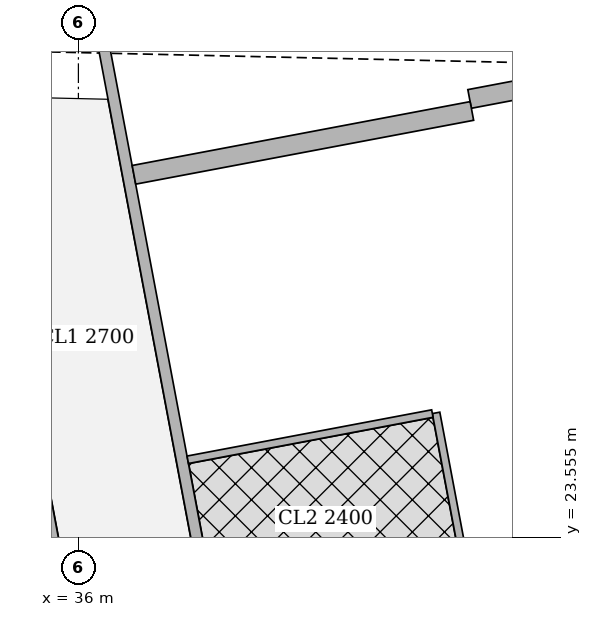
"""IFC4 building model, lengths in metres.
Left out: names, types, materials, properties, quantities, classifications, styles, units other than length and angle.
Written with IfcOpenShell. Run it as: python <this file> out.ifc"""

import sys

from ifc_helpers import new_model, si_unit, direction, frame, frame_2d, origin, place, context, subcontext, project, spatial, rectangle, extrude, element, fill, save


model = new_model("IFC4")
c1 = context("Model", 3, precision=1e-05, world=origin(), true_north=direction((0.0, 1.0)))
c2 = subcontext(c1, "Body", "Model", "MODEL_VIEW")
j1 = project(units=[si_unit("LENGTHUNIT", "METRE"), si_unit("PLANEANGLEUNIT", "RADIAN")], contexts=[c1])
p1 = place(None, origin())
s1 = spatial("IfcSite", under=j1, at=p1, CompositionType="ELEMENT")
p2 = place(p1, origin())
s2 = spatial("IfcBuilding", under=s1, at=p2, CompositionType="ELEMENT")
p3 = place(p2, frame((0.0, 0.0, 234.95)))
s3 = spatial("IfcBuildingStorey", under=s2, at=p3, CompositionType="ELEMENT", Elevation=234.95)
p4 = place(p3, frame((33.933, 42.73, 0.0), z_axis=(0.0, 0.0, 1.0), x_axis=(0.185595417643, -0.982626246825, 0.0)))
e1 = element("IfcWall", 1, at=p4, inside=s3, PredefinedType="SOLIDWALL", context=c2, shape_type="SweptSolid", body=[
    extrude(rectangle(XDim=41.051, YDim=0.15, at=frame_2d((20.525, 0.0))), origin(), (0.0, 0.0, 1.0), 2.5),
])
p5 = place(p4, frame((12.266, 0.0, 0.0)))
e2 = element("IfcOpeningElement", 2, at=p5, cuts=e1, PredefinedType="OPENING", context=c2, shape_type="SweptSolid", body=[
    extrude(rectangle(XDim=1.0, YDim=2.1, at=frame_2d((0.5, 1.05))), frame((0.0, 0.085, 0.0), z_axis=(0.0, -1.0, 0.0), x_axis=(1.0, 0.0, 0.0)), (0.0, 0.0, 1.0), 0.17),
])
p6 = place(p4, frame((16.082, 0.0, 0.0)))
e3 = element("IfcOpeningElement", 3, at=p6, cuts=e1, PredefinedType="OPENING", context=c2, shape_type="SweptSolid", body=[
    extrude(rectangle(XDim=1.0, YDim=2.1, at=frame_2d((0.5, 1.05))), frame((0.0, 0.085, 0.0), z_axis=(0.0, -1.0, 0.0), x_axis=(1.0, 0.0, 0.0)), (0.0, 0.0, 1.0), 0.17),
])
p7 = place(p4, frame((30.862, 0.0, 0.0)))
e4 = element("IfcOpeningElement", 4, at=p7, cuts=e1, PredefinedType="OPENING", context=c2, shape_type="SweptSolid", body=[
    extrude(rectangle(XDim=1.0, YDim=2.1, at=frame_2d((0.5, 1.05))), frame((0.0, 0.085, 0.0), z_axis=(0.0, -1.0, 0.0), x_axis=(1.0, 0.0, 0.0)), (0.0, 0.0, 1.0), 0.17),
])
p8 = place(p3, frame((40.706, 25.192, 0.0), z_axis=(0.0, 0.0, 1.0), x_axis=(0.185629824463, -0.982619747547, 0.0)))
e5 = element("IfcWall", 5, at=p8, inside=s3, PredefinedType="PARTITIONING", context=c2, shape_type="SweptSolid", body=[
    extrude(rectangle(XDim=9.659, YDim=0.1, at=frame_2d((4.83, 0.0))), origin(), (0.0, 0.0, 1.0), 2.5),
])
p9 = place(p8, frame((0.655, 0.0, 0.0)))
e6 = element("IfcOpeningElement", 6, at=p9, cuts=e5, PredefinedType="OPENING", context=c2, shape_type="SweptSolid", body=[
    extrude(rectangle(XDim=0.9, YDim=2.1, at=frame_2d((0.45, 1.05))), frame((0.0, 0.06, 0.0), z_axis=(0.0, -1.0, 0.0), x_axis=(1.0, 0.0, 0.0)), (0.0, 0.0, 1.0), 0.12),
])
p10 = place(p8, frame((4.166, 0.0, 0.0)))
e7 = element("IfcOpeningElement", 7, at=p10, cuts=e5, PredefinedType="OPENING", context=c2, shape_type="SweptSolid", body=[
    extrude(rectangle(XDim=0.9, YDim=2.1, at=frame_2d((0.45, 1.05))), frame((0.0, 0.06, 0.0), z_axis=(0.0, -1.0, 0.0), x_axis=(1.0, 0.0, 0.0)), (0.0, 0.0, 1.0), 0.12),
])
p11 = place(p8, frame((2.563, 0.0, 0.0)))
e8 = element("IfcOpeningElement", 8, at=p11, cuts=e5, PredefinedType="OPENING", context=c2, shape_type="SweptSolid", body=[
    extrude(rectangle(XDim=0.9, YDim=2.1, at=frame_2d((0.45, 1.05))), frame((0.0, 0.06, 0.0), z_axis=(0.0, -1.0, 0.0), x_axis=(1.0, 0.0, 0.0)), (0.0, 0.0, 1.0), 0.12),
])
p12 = place(p8, frame((6.074, 0.0, 0.0)))
e9 = element("IfcOpeningElement", 9, at=p12, cuts=e5, PredefinedType="OPENING", context=c2, shape_type="SweptSolid", body=[
    extrude(rectangle(XDim=0.9, YDim=2.1, at=frame_2d((0.45, 1.05))), frame((0.0, 0.06, 0.0), z_axis=(0.0, -1.0, 0.0), x_axis=(1.0, 0.0, 0.0)), (0.0, 0.0, 1.0), 0.12),
])
p13 = place(p3, frame((40.657, 25.183, 0.0), z_axis=(0.0, 0.0, 1.0), x_axis=(-0.982607026909, -0.185697147715, 0.0)))
e10 = element("IfcWall", 10, at=p13, inside=s3, PredefinedType="PARTITIONING", context=c2, shape_type="SweptSolid", body=[
    extrude(rectangle(XDim=3.275, YDim=0.1, at=frame_2d((1.637, 0.0))), origin(), (0.0, 0.0, 1.0), 3.5),
])
p14 = place(p3, frame((42.256, 29.532, 0.0), z_axis=(0.0, 0.0, 1.0), x_axis=(-0.982549954272, -0.185998890749, 0.0)))
e11 = element("IfcWall", 11, at=p14, inside=s3, PredefinedType="SOLIDWALL", context=c2, shape_type="SweptSolid", body=[
    extrude(rectangle(XDim=1.129, YDim=0.25, at=frame_2d((0.564, 0.0))), origin(), (0.0, 0.0, 1.0), 2.05),
])
p15 = place(p3, frame((41.177, 29.164, 0.0), z_axis=(0.0, 0.0, 1.0), x_axis=(-0.982612837616, -0.185666398014, 0.0)))
e12 = element("IfcWall", 12, at=p15, inside=s3, PredefinedType="SOLIDWALL", context=c2, shape_type="SweptSolid", body=[
    extrude(rectangle(XDim=4.525, YDim=0.25, at=frame_2d((2.262, 0.0))), origin(), (0.0, 0.0, 1.0), 2.5),
])
p16 = place(p3, frame((38.202, 10.163, 0.0), z_axis=(0.0, 0.0, 1.0), x_axis=(-0.185610321132, 0.982623431783, 0.0)))
e13 = element("IfcWall", 13, at=p16, inside=s3, PredefinedType="PARTITIONING", context=c2, shape_type="SweptSolid", body=[
    extrude(rectangle(XDim=25.111, YDim=0.125, at=frame_2d((12.556, 0.0))), origin(), (0.0, 0.0, 1.0), 2.5),
])
p17 = place(p16, frame((0.708, 0.0, 0.0)))
e14 = element("IfcOpeningElement", 14, at=p17, cuts=e13, PredefinedType="OPENING", context=c2, shape_type="SweptSolid", body=[
    extrude(rectangle(XDim=1.0, YDim=2.1, at=frame_2d((0.5, 1.05))), frame((0.0, 0.073, 0.0), z_axis=(0.0, -1.0, 0.0), x_axis=(1.0, 0.0, 0.0)), (0.0, 0.0, 1.0), 0.145),
])
p18 = place(p16, frame((13.378, 0.0, 0.0)))
e15 = element("IfcOpeningElement", 15, at=p18, cuts=e13, PredefinedType="OPENING", context=c2, shape_type="SweptSolid", body=[
    extrude(rectangle(XDim=1.0, YDim=2.1, at=frame_2d((0.5, 1.05))), frame((0.0, 0.073, 0.0), z_axis=(0.0, -1.0, 0.0), x_axis=(1.0, 0.0, 0.0)), (0.0, 0.0, 1.0), 0.145),
])
p19 = place(p16, frame((21.15, 0.0, 0.0)))
e16 = element("IfcOpeningElement", 16, at=p19, cuts=e13, PredefinedType="OPENING", context=c2, shape_type="SweptSolid", body=[
    extrude(rectangle(XDim=1.0, YDim=2.1, at=frame_2d((0.5, 1.05))), frame((0.0, 0.073, 0.0), z_axis=(0.0, -1.0, 0.0), x_axis=(1.0, 0.0, 0.0)), (0.0, 0.0, 1.0), 0.145),
])
p20 = place(p16, frame((23.453, 0.0, 0.0)))
e17 = element("IfcOpeningElement", 17, at=p20, cuts=e13, PredefinedType="OPENING", context=c2, shape_type="SweptSolid", body=[
    extrude(rectangle(XDim=1.0, YDim=2.1, at=frame_2d((0.5, 1.05))), frame((0.0, 0.073, 0.0), z_axis=(0.0, -1.0, 0.0), x_axis=(1.0, 0.0, 0.0)), (0.0, 0.0, 1.0), 0.145),
])
p21 = place(p5, origin())
e18 = element("IfcDoor", 18, at=p21, inside=s3, OperationType="SINGLE_SWING_RIGHT", PredefinedType="DOOR", context=c2, shape_type="SweptSolid", body=[
    extrude(rectangle(XDim=1.0, YDim=2.1, at=frame_2d((0.5, 1.05))), frame((0.0, 0.025, 0.0), z_axis=(0.0, -1.0, 0.0), x_axis=(1.0, 0.0, 0.0)), (0.0, 0.0, 1.0), 0.05),
])
fill(e2, e18)
p22 = place(p9, origin())
e19 = element("IfcDoor", 19, at=p22, inside=s3, OperationType="SINGLE_SWING_RIGHT", PredefinedType="DOOR", context=c2, shape_type="SweptSolid", body=[
    extrude(rectangle(XDim=0.9, YDim=2.1, at=frame_2d((0.45, 1.05))), frame((0.0, 0.025, 0.0), z_axis=(0.0, -1.0, 0.0), x_axis=(1.0, 0.0, 0.0)), (0.0, 0.0, 1.0), 0.05),
])
fill(e6, e19)
p23 = place(p6, origin())
e20 = element("IfcDoor", 20, at=p23, inside=s3, OperationType="SINGLE_SWING_LEFT", PredefinedType="DOOR", context=c2, shape_type="SweptSolid", body=[
    extrude(rectangle(XDim=1.0, YDim=2.1, at=frame_2d((0.5, 1.05))), frame((0.0, 0.025, 0.0), z_axis=(0.0, -1.0, 0.0), x_axis=(1.0, 0.0, 0.0)), (0.0, 0.0, 1.0), 0.05),
])
fill(e3, e20)
p24 = place(p18, origin())
e21 = element("IfcDoor", 21, at=p24, inside=s3, OperationType="SINGLE_SWING_LEFT", PredefinedType="DOOR", context=c2, shape_type="SweptSolid", body=[
    extrude(rectangle(XDim=1.0, YDim=2.1, at=frame_2d((0.5, 1.05))), frame((0.0, 0.025, 0.0), z_axis=(0.0, -1.0, 0.0), x_axis=(1.0, 0.0, 0.0)), (0.0, 0.0, 1.0), 0.05),
])
fill(e15, e21)
save(model, sys.argv[1])
